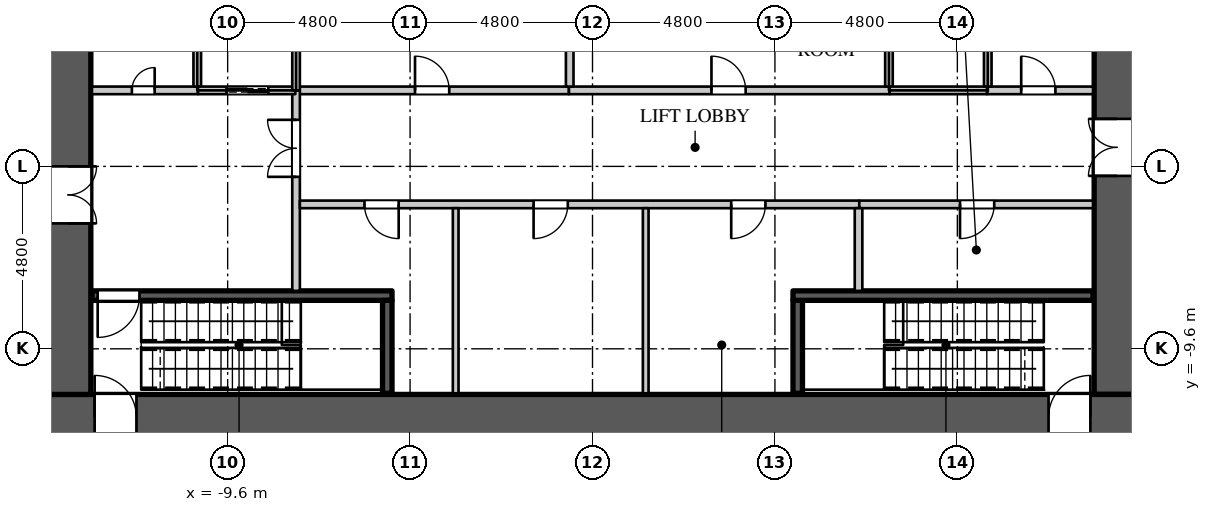
"""IFC4 building model, lengths in metres.
Left out: names, types, materials, properties, quantities, classifications, styles, units other than length and angle.
Written with IfcOpenShell. Run it as: python <this file> out.ifc"""

import sys

from ifc_helpers import new_model, si_unit, direction, frame, frame_2d, origin, place, context, subcontext, project, spatial, rectangle, extrude, element, fill, save


model = new_model("IFC4")
c1 = context("Model", 3, precision=1e-05, world=origin(), true_north=direction((0.0, 1.0)))
c2 = subcontext(c1, "Body", "Model", "MODEL_VIEW")
j1 = project(units=[si_unit("LENGTHUNIT", "METRE"), si_unit("PLANEANGLEUNIT", "RADIAN")], contexts=[c1])
p1 = place(None, origin())
s1 = spatial("IfcSite", under=j1, at=p1, CompositionType="ELEMENT")
p2 = place(p1, origin())
s2 = spatial("IfcBuilding", under=s1, at=p2, CompositionType="ELEMENT")
p3 = place(p2, frame((0.0, 0.0, 11.0)))
s3 = spatial("IfcBuildingStorey", under=s2, at=p3, CompositionType="ELEMENT", Elevation=11.0)
p4 = place(p3, frame((-14.4, -11.4, 0.0), z_axis=(0.0, 0.0, 1.0), x_axis=(1.0, 0.0, 0.0)))
e1 = element("IfcWall", 1, at=p4, inside=s3, PredefinedType="SHEAR", context=c2, shape_type="SweptSolid", body=[
    extrude(rectangle(XDim=28.8, YDim=1.2, at=frame_2d((14.4, 0.0))), origin(), (0.0, 0.0, 1.0), 5.0),
])
p5 = place(p4, frame((1.3, 0.0, 0.0)))
e2 = element("IfcOpeningElement", 2, at=p5, cuts=e1, PredefinedType="OPENING", context=c2, shape_type="SweptSolid", body=[
    extrude(rectangle(XDim=1.1, YDim=2.2, at=frame_2d((0.55, 1.1))), frame((0.0, 0.61, 0.0), z_axis=(0.0, -1.0, 0.0), x_axis=(1.0, 0.0, 0.0)), (0.0, 0.0, 1.0), 1.22),
])
p6 = place(p4, frame((26.4, 0.0, 0.0)))
e3 = element("IfcOpeningElement", 3, at=p6, cuts=e1, PredefinedType="OPENING", context=c2, shape_type="SweptSolid", body=[
    extrude(rectangle(XDim=1.1, YDim=2.2, at=frame_2d((0.55, 1.1))), frame((0.0, 0.61, 0.0), z_axis=(0.0, -1.0, 0.0), x_axis=(1.0, 0.0, 0.0)), (0.0, 0.0, 1.0), 1.22),
])
p7 = place(p3, frame((13.8, -10.8, 0.0), z_axis=(0.0, 0.0, 1.0), x_axis=(0.0, 1.0, 0.0)))
e4 = element("IfcWall", 4, at=p7, inside=s3, PredefinedType="SHEAR", context=c2, shape_type="SweptSolid", body=[
    extrude(rectangle(XDim=21.6, YDim=1.2, at=frame_2d((10.8, 0.0))), origin(), (0.0, 0.0, 1.0), 5.0),
])
p8 = place(p7, frame((14.35, 0.0, 0.0)))
e5 = element("IfcOpeningElement", 5, at=p8, cuts=e4, PredefinedType="OPENING", context=c2, shape_type="SweptSolid", body=[
    extrude(rectangle(XDim=1.5, YDim=2.4, at=frame_2d((0.75, 1.2))), frame((0.0, 0.61, 0.0), z_axis=(0.0, -1.0, 0.0), x_axis=(1.0, 0.0, 0.0)), (0.0, 0.0, 1.0), 1.22),
])
p9 = place(p7, frame((5.75, 0.0, 0.0)))
e6 = element("IfcOpeningElement", 6, at=p9, cuts=e4, PredefinedType="OPENING", context=c2, shape_type="SweptSolid", body=[
    extrude(rectangle(XDim=1.5, YDim=2.4, at=frame_2d((0.75, 1.2))), frame((0.0, 0.61, 0.0), z_axis=(0.0, -1.0, 0.0), x_axis=(1.0, 0.0, 0.0)), (0.0, 0.0, 1.0), 1.22),
])
p10 = place(p3, frame((-13.8, -10.8, 0.0), z_axis=(0.0, 0.0, 1.0), x_axis=(0.0, 1.0, 0.0)))
e7 = element("IfcWall", 7, at=p10, inside=s3, PredefinedType="SHEAR", context=c2, shape_type="SweptSolid", body=[
    extrude(rectangle(XDim=21.6, YDim=1.2, at=frame_2d((10.8, 0.0))), origin(), (0.0, 0.0, 1.0), 5.0),
])
p11 = place(p10, frame((15.5, 0.0, 0.0)))
e8 = element("IfcOpeningElement", 8, at=p11, cuts=e7, PredefinedType="OPENING", context=c2, shape_type="SweptSolid", body=[
    extrude(rectangle(XDim=1.5, YDim=2.4, at=frame_2d((0.75, 1.2))), frame((0.0, 0.61, 0.0), z_axis=(0.0, -1.0, 0.0), x_axis=(1.0, 0.0, 0.0)), (0.0, 0.0, 1.0), 1.22),
])
p12 = place(p10, frame((4.5, 0.0, 0.0)))
e9 = element("IfcOpeningElement", 9, at=p12, cuts=e7, PredefinedType="OPENING", context=c2, shape_type="SweptSolid", body=[
    extrude(rectangle(XDim=1.5, YDim=2.4, at=frame_2d((0.75, 1.2))), frame((0.0, 0.61, 0.0), z_axis=(0.0, -1.0, 0.0), x_axis=(1.0, 0.0, 0.0)), (0.0, 0.0, 1.0), 1.22),
])
p13 = place(p3, frame((-7.82, -2.8, 0.0), z_axis=(0.0, 0.0, 1.0), x_axis=(1.0, 0.0, 0.0)))
e10 = element("IfcWall", 10, at=p13, inside=s3, PredefinedType="PARTITIONING", context=c2, shape_type="SweptSolid", body=[
    extrude(rectangle(XDim=7.2, YDim=0.2, at=frame_2d((3.6, 0.0))), origin(), (0.0, 0.0, 1.0), 4.65),
])
p14 = place(p13, frame((3.15, 0.0, 0.0)))
e11 = element("IfcOpeningElement", 11, at=p14, cuts=e10, PredefinedType="OPENING", context=c2, shape_type="SweptSolid", body=[
    extrude(rectangle(XDim=0.9, YDim=2.2, at=frame_2d((0.45, 1.1))), frame((0.0, 0.11, 0.0), z_axis=(0.0, -1.0, 0.0), x_axis=(1.0, 0.0, 0.0)), (0.0, 0.0, 1.0), 0.22),
])
p15 = place(p3, frame((-7.8, -8.075, 0.0), z_axis=(0.0, 0.0, 1.0), x_axis=(0.0, 1.0, 0.0)))
e12 = element("IfcWall", 12, at=p15, inside=s3, PredefinedType="PARTITIONING", context=c2, shape_type="SweptSolid", body=[
    extrude(rectangle(XDim=5.275, YDim=0.2, at=frame_2d((2.637, 0.0))), origin(), (0.0, 0.0, 1.0), 4.65),
])
p16 = place(p15, frame((3.0, 0.0, 0.0)))
e13 = element("IfcOpeningElement", 13, at=p16, cuts=e12, PredefinedType="OPENING", context=c2, shape_type="SweptSolid", body=[
    extrude(rectangle(XDim=1.5, YDim=2.4, at=frame_2d((0.75, 1.2))), frame((0.0, 0.11, 0.0), z_axis=(0.0, -1.0, 0.0), x_axis=(1.0, 0.0, 0.0)), (0.0, 0.0, 1.0), 0.22),
])
p17 = place(p3, frame((-7.7, -5.8, 0.0), z_axis=(0.0, 0.0, 1.0), x_axis=(1.0, 0.0, 0.0)))
e14 = element("IfcWall", 14, at=p17, inside=s3, PredefinedType="PARTITIONING", context=c2, shape_type="SweptSolid", body=[
    extrude(rectangle(XDim=14.72, YDim=0.2, at=frame_2d((7.36, 0.0))), origin(), (0.0, 0.0, 1.0), 4.65),
])
p18 = place(p17, frame((1.7, 0.0, 0.0)))
e15 = element("IfcOpeningElement", 15, at=p18, cuts=e14, PredefinedType="OPENING", context=c2, shape_type="SweptSolid", body=[
    extrude(rectangle(XDim=0.9, YDim=2.2, at=frame_2d((0.45, 1.1))), frame((0.0, 0.11, 0.0), z_axis=(0.0, -1.0, 0.0), x_axis=(1.0, 0.0, 0.0)), (0.0, 0.0, 1.0), 0.22),
])
p19 = place(p17, frame((6.15, 0.0, 0.0)))
e16 = element("IfcOpeningElement", 16, at=p19, cuts=e14, PredefinedType="OPENING", context=c2, shape_type="SweptSolid", body=[
    extrude(rectangle(XDim=0.9, YDim=2.2, at=frame_2d((0.45, 1.1))), frame((0.0, 0.11, 0.0), z_axis=(0.0, -1.0, 0.0), x_axis=(1.0, 0.0, 0.0)), (0.0, 0.0, 1.0), 0.22),
])
p20 = place(p17, frame((11.35, 0.0, 0.0)))
e17 = element("IfcOpeningElement", 17, at=p20, cuts=e14, PredefinedType="OPENING", context=c2, shape_type="SweptSolid", body=[
    extrude(rectangle(XDim=0.9, YDim=2.2, at=frame_2d((0.45, 1.1))), frame((0.0, 0.11, 0.0), z_axis=(0.0, -1.0, 0.0), x_axis=(1.0, 0.0, 0.0)), (0.0, 0.0, 1.0), 0.22),
])
for number, where, z_axis, x_axis in (
    (18, (-3.6, -10.77, 0.0), (0.0, 0.0, 1.0), (0.0, 1.0, 0.0)),
    (19, (1.4, -10.77, 0.0), (0.0, 0.0, 1.0), (0.0, 1.0, 0.0)),
):
    element("IfcWall", number, at=place(p3, frame(where, z_axis=z_axis, x_axis=x_axis)), inside=s3, PredefinedType="PARTITIONING", context=c2, shape_type="SweptSolid", body=[
        extrude(rectangle(XDim=4.87, YDim=0.15, at=frame_2d((2.435, 0.0))), origin(), (0.0, 0.0, 1.0), 4.65),
    ])
p21 = place(p3, frame((-13.17, -2.8, 0.0), z_axis=(0.0, 0.0, 1.0), x_axis=(1.0, 0.0, 0.0)))
e20 = element("IfcWall", 20, at=p21, inside=s3, PredefinedType="PARTITIONING", context=c2, shape_type="SweptSolid", body=[
    extrude(rectangle(XDim=2.79, YDim=0.2, at=frame_2d((1.395, 0.0))), origin(), (0.0, 0.0, 1.0), 4.65),
])
p22 = place(p21, frame((1.05, 0.0, 0.0)))
e21 = element("IfcOpeningElement", 21, at=p22, cuts=e20, PredefinedType="OPENING", context=c2, shape_type="SweptSolid", body=[
    extrude(rectangle(XDim=0.6, YDim=2.0, at=frame_2d((0.3, 1.0))), frame((0.0, 0.11, 0.0), z_axis=(0.0, -1.0, 0.0), x_axis=(1.0, 0.0, 0.0)), (0.0, 0.0, 1.0), 0.22),
])
p23 = place(p3, frame((-0.62, -2.8, 0.0), z_axis=(0.0, 0.0, 1.0), x_axis=(1.0, 0.0, 0.0)))
e22 = element("IfcWall", 22, at=p23, inside=s3, PredefinedType="PARTITIONING", context=c2, shape_type="SweptSolid", body=[
    extrude(rectangle(XDim=8.44, YDim=0.2, at=frame_2d((4.22, 0.0))), origin(), (0.0, 0.0, 1.0), 4.65),
])
p24 = place(p23, frame((3.75, 0.0, 0.0)))
e23 = element("IfcOpeningElement", 23, at=p24, cuts=e22, PredefinedType="OPENING", context=c2, shape_type="SweptSolid", body=[
    extrude(rectangle(XDim=0.9, YDim=2.2, at=frame_2d((0.45, 1.1))), frame((0.0, 0.11, 0.0), z_axis=(0.0, -1.0, 0.0), x_axis=(1.0, 0.0, 0.0)), (0.0, 0.0, 1.0), 0.22),
])
p25 = place(p3, frame((-0.6, -2.7, 0.0), z_axis=(0.0, 0.0, 1.0), x_axis=(0.0, 1.0, 0.0)))
e24 = element("IfcWall", 24, at=p25, inside=s3, PredefinedType="PARTITIONING", context=c2, shape_type="SweptSolid", body=[
    extrude(rectangle(XDim=2.6, YDim=0.2, at=frame_2d((1.3, 0.0))), origin(), (0.0, 0.0, 1.0), 4.65),
])
p26 = place(p3, frame((7.02, -5.8, 0.0), z_axis=(0.0, 0.0, 1.0), x_axis=(1.0, 0.0, 0.0)))
e25 = element("IfcWall", 25, at=p26, inside=s3, PredefinedType="PARTITIONING", context=c2, shape_type="SweptSolid", body=[
    extrude(rectangle(XDim=6.15, YDim=0.2, at=frame_2d((3.075, 0.0))), origin(), (0.0, 0.0, 1.0), 4.65),
])
p27 = place(p26, frame((2.65, 0.0, 0.0)))
e26 = element("IfcOpeningElement", 26, at=p27, cuts=e25, PredefinedType="OPENING", context=c2, shape_type="SweptSolid", body=[
    extrude(rectangle(XDim=0.9, YDim=2.2, at=frame_2d((0.45, 1.1))), frame((0.0, 0.11, 0.0), z_axis=(0.0, -1.0, 0.0), x_axis=(1.0, 0.0, 0.0)), (0.0, 0.0, 1.0), 0.22),
])
p28 = place(p3, frame((7.0, -8.075, 0.0), z_axis=(0.0, 0.0, 1.0), x_axis=(0.0, 1.0, 0.0)))
e27 = element("IfcWall", 27, at=p28, inside=s3, PredefinedType="PARTITIONING", context=c2, shape_type="SweptSolid", body=[
    extrude(rectangle(XDim=2.175, YDim=0.2, at=frame_2d((1.087, 0.0))), origin(), (0.0, 0.0, 1.0), 4.65),
])
p29 = place(p3, frame((10.38, -2.8, 0.0), z_axis=(0.0, 0.0, 1.0), x_axis=(1.0, 0.0, 0.0)))
e28 = element("IfcWall", 28, at=p29, inside=s3, PredefinedType="PARTITIONING", context=c2, shape_type="SweptSolid", body=[
    extrude(rectangle(XDim=2.79, YDim=0.2, at=frame_2d((1.395, 0.0))), origin(), (0.0, 0.0, 1.0), 4.65),
])
p30 = place(p29, frame((0.9, 0.0, 0.0)))
e29 = element("IfcOpeningElement", 29, at=p30, cuts=e28, PredefinedType="OPENING", context=c2, shape_type="SweptSolid", body=[
    extrude(rectangle(XDim=0.9, YDim=2.2, at=frame_2d((0.45, 1.1))), frame((0.0, 0.11, 0.0), z_axis=(0.0, -1.0, 0.0), x_axis=(1.0, 0.0, 0.0)), (0.0, 0.0, 1.0), 0.22),
])
p31 = place(p3, frame((-10.4, -2.7, 0.0), z_axis=(0.0, 0.0, 1.0), x_axis=(0.0, 1.0, 0.0)))
e30 = element("IfcWall", 30, at=p31, inside=s3, PredefinedType="PARTITIONING", context=c2, shape_type="SweptSolid", body=[
    extrude(rectangle(XDim=2.7, YDim=0.2, at=frame_2d((1.35, 0.0))), origin(), (0.0, 0.0, 1.0), 4.65),
])
p32 = place(p3, frame((-10.38, -2.8, 0.0), z_axis=(0.0, 0.0, 1.0), x_axis=(1.0, 0.0, 0.0)))
e31 = element("IfcWall", 31, at=p32, inside=s3, PredefinedType="PARTITIONING", context=c2, shape_type="SweptSolid", body=[
    extrude(rectangle(XDim=2.56, YDim=0.2, at=frame_2d((1.28, 0.0))), origin(), (0.0, 0.0, 1.0), 4.65),
])
p33 = place(p32, frame((0.75, 0.0, 0.0)))
e32 = element("IfcOpeningElement", 32, at=p33, cuts=e31, PredefinedType="OPENING", context=c2, shape_type="SweptSolid", body=[
    extrude(rectangle(XDim=1.1, YDim=2.2, at=frame_2d((0.55, 1.1))), frame((0.0, 0.11, 0.0), z_axis=(0.0, -1.0, 0.0), x_axis=(1.0, 0.0, 0.0)), (0.0, 0.0, 1.0), 0.22),
])
p34 = place(p3, frame((-7.8, -2.8, 0.0), z_axis=(0.0, 0.0, 1.0), x_axis=(0.0, 1.0, 0.0)))
e33 = element("IfcWall", 33, at=p34, inside=s3, PredefinedType="PARTITIONING", context=c2, shape_type="SweptSolid", body=[
    extrude(rectangle(XDim=2.8, YDim=0.2, at=frame_2d((1.4, 0.0))), origin(), (0.0, 0.0, 1.0), 4.65),
])
p35 = place(p3, frame((7.8, -2.7, 0.0), z_axis=(0.0, 0.0, 1.0), x_axis=(0.0, 1.0, 0.0)))
e34 = element("IfcWall", 34, at=p35, inside=s3, PredefinedType="PARTITIONING", context=c2, shape_type="SweptSolid", body=[
    extrude(rectangle(XDim=2.7, YDim=0.2, at=frame_2d((1.35, 0.0))), origin(), (0.0, 0.0, 1.0), 4.65),
])
p36 = place(p3, frame((7.82, -2.8, 0.0), z_axis=(0.0, 0.0, 1.0), x_axis=(1.0, 0.0, 0.0)))
e35 = element("IfcWall", 35, at=p36, inside=s3, PredefinedType="PARTITIONING", context=c2, shape_type="SweptSolid", body=[
    extrude(rectangle(XDim=2.56, YDim=0.2, at=frame_2d((1.28, 0.0))), origin(), (0.0, 0.0, 1.0), 4.65),
])
p37 = place(p3, frame((10.4, -2.7, 0.0), z_axis=(0.0, 0.0, 1.0), x_axis=(0.0, 1.0, 0.0)))
e36 = element("IfcWall", 36, at=p37, inside=s3, PredefinedType="PARTITIONING", context=c2, shape_type="SweptSolid", body=[
    extrude(rectangle(XDim=5.4, YDim=0.2, at=frame_2d((2.7, 0.0))), origin(), (0.0, 0.0, 1.0), 4.65),
])
p38 = place(p3, frame((-13.17, -8.2, 0.0), z_axis=(0.0, 0.0, 1.0), x_axis=(1.0, 0.0, 0.0)))
e37 = element("IfcWall", 37, at=p38, inside=s3, PredefinedType="SHEAR", context=c2, shape_type="SweptSolid", body=[
    extrude(rectangle(XDim=7.895, YDim=0.25, at=frame_2d((3.948, 0.0))), origin(), (0.0, 0.0, 1.0), 4.65),
])
p39 = place(p38, frame((0.15, 0.0, 0.0)))
e38 = element("IfcOpeningElement", 38, at=p39, cuts=e37, PredefinedType="OPENING", context=c2, shape_type="SweptSolid", body=[
    extrude(rectangle(XDim=1.1, YDim=2.2, at=frame_2d((0.55, 1.1))), frame((0.0, 0.135, 0.0), z_axis=(0.0, -1.0, 0.0), x_axis=(1.0, 0.0, 0.0)), (0.0, 0.0, 1.0), 0.27),
])
for number, where, z_axis, x_axis in (
    (39, (-5.4, -10.77, 0.0), (0.0, 0.0, 1.0), (0.0, 1.0, 0.0)),
    (40, (5.4, -10.77, 0.0), (0.0, 0.0, 1.0), (0.0, 1.0, 0.0)),
):
    element("IfcWall", number, at=place(p3, frame(where, z_axis=z_axis, x_axis=x_axis)), inside=s3, PredefinedType="SHEAR", context=c2, shape_type="SweptSolid", body=[
        extrude(rectangle(XDim=2.445, YDim=0.25, at=frame_2d((1.223, 0.0))), origin(), (0.0, 0.0, 1.0), 4.65),
    ])
p40 = place(p3, frame((5.275, -8.2, 0.0), z_axis=(0.0, 0.0, 1.0), x_axis=(1.0, 0.0, 0.0)))
e41 = element("IfcWall", 41, at=p40, inside=s3, PredefinedType="SHEAR", context=c2, shape_type="SweptSolid", body=[
    extrude(rectangle(XDim=7.895, YDim=0.25, at=frame_2d((3.948, 0.0))), origin(), (0.0, 0.0, 1.0), 4.65),
])
p41 = place(p22, origin())
e42 = element("IfcDoor", 42, at=p41, inside=s3, OperationType="SINGLE_SWING_RIGHT", PredefinedType="DOOR", context=c2, shape_type="SweptSolid", body=[
    extrude(rectangle(XDim=0.6, YDim=2.0, at=frame_2d((0.3, 1.0))), frame((0.0, 0.025, 0.0), z_axis=(0.0, -1.0, 0.0), x_axis=(1.0, 0.0, 0.0)), (0.0, 0.0, 1.0), 0.05),
])
fill(e21, e42)
p42 = place(p30, origin())
e43 = element("IfcDoor", 43, at=p42, inside=s3, OperationType="SINGLE_SWING_LEFT", PredefinedType="DOOR", context=c2, shape_type="SweptSolid", body=[
    extrude(rectangle(XDim=0.9, YDim=2.2, at=frame_2d((0.45, 1.1))), frame((0.0, 0.025, 0.0), z_axis=(0.0, -1.0, 0.0), x_axis=(1.0, 0.0, 0.0)), (0.0, 0.0, 1.0), 0.05),
])
fill(e29, e43)
p43 = place(p18, origin())
e44 = element("IfcDoor", 44, at=p43, inside=s3, OperationType="SINGLE_SWING_LEFT", PredefinedType="DOOR", context=c2, shape_type="SweptSolid", body=[
    extrude(rectangle(XDim=0.9, YDim=2.2, at=frame_2d((0.45, 1.1))), frame((0.0, 0.025, 0.0), z_axis=(0.0, -1.0, 0.0), x_axis=(1.0, 0.0, 0.0)), (0.0, 0.0, 1.0), 0.05),
])
fill(e15, e44)
p44 = place(p19, origin())
e45 = element("IfcDoor", 45, at=p44, inside=s3, OperationType="SINGLE_SWING_RIGHT", PredefinedType="DOOR", context=c2, shape_type="SweptSolid", body=[
    extrude(rectangle(XDim=0.9, YDim=2.2, at=frame_2d((0.45, 1.1))), frame((0.0, 0.025, 0.0), z_axis=(0.0, -1.0, 0.0), x_axis=(1.0, 0.0, 0.0)), (0.0, 0.0, 1.0), 0.05),
])
fill(e16, e45)
p45 = place(p20, origin())
e46 = element("IfcDoor", 46, at=p45, inside=s3, OperationType="SINGLE_SWING_RIGHT", PredefinedType="DOOR", context=c2, shape_type="SweptSolid", body=[
    extrude(rectangle(XDim=0.9, YDim=2.2, at=frame_2d((0.45, 1.1))), frame((0.0, 0.025, 0.0), z_axis=(0.0, -1.0, 0.0), x_axis=(1.0, 0.0, 0.0)), (0.0, 0.0, 1.0), 0.05),
])
fill(e17, e46)
p46 = place(p27, origin())
e47 = element("IfcDoor", 47, at=p46, inside=s3, OperationType="SINGLE_SWING_RIGHT", PredefinedType="DOOR", context=c2, shape_type="SweptSolid", body=[
    extrude(rectangle(XDim=0.9, YDim=2.2, at=frame_2d((0.45, 1.1))), frame((0.0, 0.025, 0.0), z_axis=(0.0, -1.0, 0.0), x_axis=(1.0, 0.0, 0.0)), (0.0, 0.0, 1.0), 0.05),
])
fill(e26, e47)
p47 = place(p14, origin())
e48 = element("IfcDoor", 48, at=p47, inside=s3, OperationType="SINGLE_SWING_LEFT", PredefinedType="DOOR", context=c2, shape_type="SweptSolid", body=[
    extrude(rectangle(XDim=0.9, YDim=2.2, at=frame_2d((0.45, 1.1))), frame((0.0, 0.025, 0.0), z_axis=(0.0, -1.0, 0.0), x_axis=(1.0, 0.0, 0.0)), (0.0, 0.0, 1.0), 0.05),
])
fill(e11, e48)
p48 = place(p24, origin())
e49 = element("IfcDoor", 49, at=p48, inside=s3, OperationType="SINGLE_SWING_LEFT", PredefinedType="DOOR", context=c2, shape_type="SweptSolid", body=[
    extrude(rectangle(XDim=0.9, YDim=2.2, at=frame_2d((0.45, 1.1))), frame((0.0, 0.025, 0.0), z_axis=(0.0, -1.0, 0.0), x_axis=(1.0, 0.0, 0.0)), (0.0, 0.0, 1.0), 0.05),
])
fill(e23, e49)
p49 = place(p33, origin())
e50 = element("IfcDoor", 50, at=p49, inside=s3, OperationType="DOUBLE_DOOR_SLIDING", PredefinedType="DOOR", context=c2, shape_type="SweptSolid", body=[
    extrude(rectangle(XDim=1.1, YDim=2.2, at=frame_2d((0.55, 1.1))), frame((0.0, 0.025, 0.0), z_axis=(0.0, -1.0, 0.0), x_axis=(1.0, 0.0, 0.0)), (0.0, 0.0, 1.0), 0.05),
])
fill(e32, e50)
p50 = place(p39, origin())
e51 = element("IfcDoor", 51, at=p50, inside=s3, OperationType="SINGLE_SWING_RIGHT", PredefinedType="DOOR", context=c2, shape_type="SweptSolid", body=[
    extrude(rectangle(XDim=1.1, YDim=2.2, at=frame_2d((0.55, 1.1))), frame((0.0, 0.025, 0.0), z_axis=(0.0, -1.0, 0.0), x_axis=(1.0, 0.0, 0.0)), (0.0, 0.0, 1.0), 0.05),
])
fill(e38, e51)
p51 = place(p16, origin())
e52 = element("IfcDoor", 52, at=p51, inside=s3, OperationType="DOUBLE_DOOR_SINGLE_SWING", PredefinedType="DOOR", context=c2, shape_type="SweptSolid", body=[
    extrude(rectangle(XDim=1.5, YDim=2.4, at=frame_2d((0.75, 1.2))), frame((0.0, 0.025, 0.0), z_axis=(0.0, -1.0, 0.0), x_axis=(1.0, 0.0, 0.0)), (0.0, 0.0, 1.0), 0.05),
])
fill(e13, e52)
p52 = place(p9, origin())
e53 = element("IfcDoor", 53, at=p52, inside=s3, OperationType="DOUBLE_DOOR_SINGLE_SWING", PredefinedType="DOOR", context=c2, shape_type="SweptSolid", body=[
    extrude(rectangle(XDim=1.5, YDim=2.4, at=frame_2d((0.75, 1.2))), frame((0.0, 0.025, 0.0), z_axis=(0.0, -1.0, 0.0), x_axis=(1.0, 0.0, 0.0)), (0.0, 0.0, 1.0), 0.05),
])
fill(e6, e53)
p53 = place(p12, origin())
e54 = element("IfcDoor", 54, at=p53, inside=s3, OperationType="DOUBLE_DOOR_SINGLE_SWING", PredefinedType="DOOR", context=c2, shape_type="SweptSolid", body=[
    extrude(rectangle(XDim=1.5, YDim=2.4, at=frame_2d((0.75, 1.2))), frame((0.0, 0.025, 0.0), z_axis=(0.0, -1.0, 0.0), x_axis=(1.0, 0.0, 0.0)), (0.0, 0.0, 1.0), 0.05),
])
fill(e9, e54)
p54 = place(p5, origin())
e55 = element("IfcDoor", 55, at=p54, inside=s3, OperationType="SINGLE_SWING_LEFT", PredefinedType="DOOR", context=c2, shape_type="SweptSolid", body=[
    extrude(rectangle(XDim=1.1, YDim=2.2, at=frame_2d((0.55, 1.1))), frame((0.0, 0.025, 0.0), z_axis=(0.0, -1.0, 0.0), x_axis=(1.0, 0.0, 0.0)), (0.0, 0.0, 1.0), 0.05),
])
fill(e2, e55)
p55 = place(p6, origin())
e56 = element("IfcDoor", 56, at=p55, inside=s3, OperationType="SINGLE_SWING_RIGHT", PredefinedType="DOOR", context=c2, shape_type="SweptSolid", body=[
    extrude(rectangle(XDim=1.1, YDim=2.2, at=frame_2d((0.55, 1.1))), frame((0.0, 0.025, 0.0), z_axis=(0.0, -1.0, 0.0), x_axis=(1.0, 0.0, 0.0)), (0.0, 0.0, 1.0), 0.05),
])
fill(e3, e56)
save(model, sys.argv[1])
